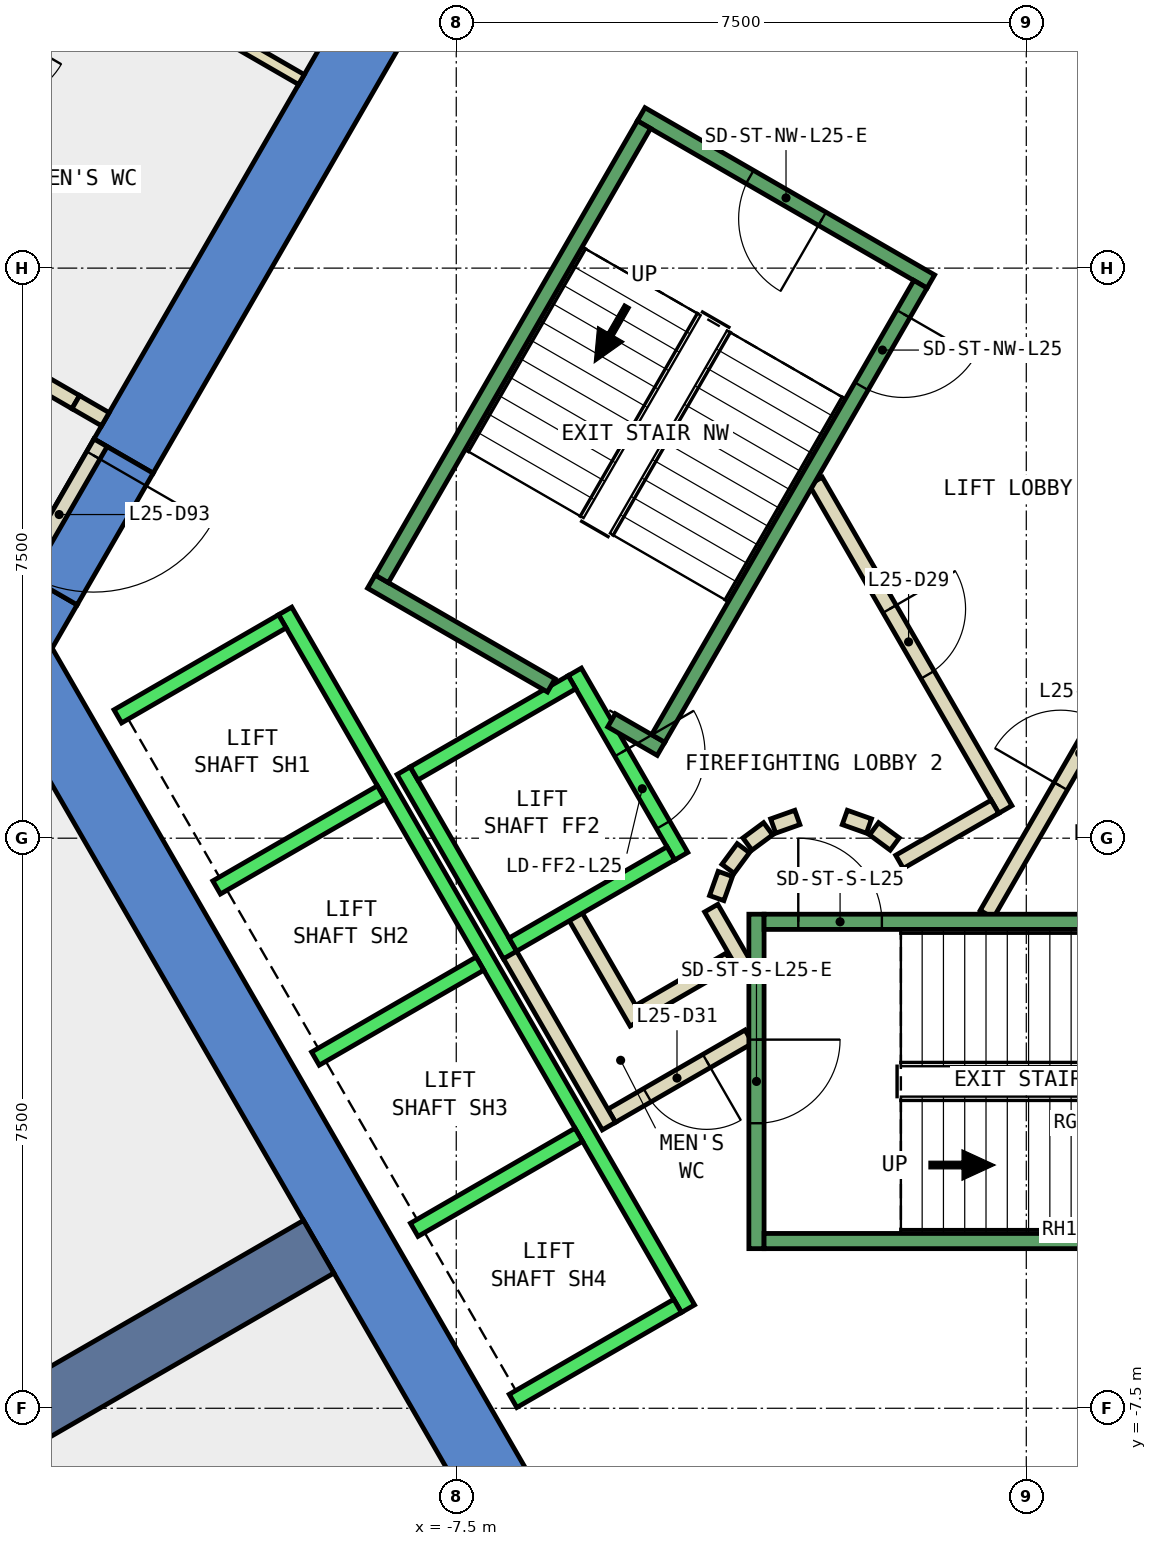
"""IFC4 building model, lengths in metres.
Left out: names, types, materials, properties, quantities, classifications, styles, units other than length and angle.
Written with IfcOpenShell. Run it as: python <this file> out.ifc"""

import sys

from ifc_helpers import new_model, si_unit, direction, frame, frame_2d, origin, place, context, subcontext, project, spatial, polyline, rectangle, outline, extrude, element, fill, save


model = new_model("IFC4")
c1 = context("Model", 3, precision=1e-05, world=origin(), true_north=direction((0.0, 1.0)))
c2 = subcontext(c1, "Body", "Model", "MODEL_VIEW")
j1 = project(units=[si_unit("LENGTHUNIT", "METRE"), si_unit("PLANEANGLEUNIT", "RADIAN")], contexts=[c1])
p1 = place(None, origin())
s1 = spatial("IfcSite", under=j1, at=p1, CompositionType="ELEMENT")
p2 = place(p1, origin())
s2 = spatial("IfcBuilding", under=s1, at=p2, CompositionType="ELEMENT")
p3 = place(p2, frame((0.0, 0.0, 116.0)))
s3 = spatial("IfcBuildingStorey", under=s2, at=p3, CompositionType="ELEMENT", Elevation=116.0)
p4 = place(p3, frame((0.0, 0.0, -0.4)))
e1 = element("IfcWall", 1, at=p4, inside=s3, PredefinedType="SHEAR", context=c2, shape_type="SweptSolid", body=[
    extrude(outline(polyline([(-12.267, 5.252), (-11.488, 4.802), (-6.409, 13.6), (-6.928, 14.5), (-12.267, 5.252)])), origin(), (0.0, 0.0, 1.0), 4.2),
])
p5 = place(p3, frame((0.0, 0.0, -0.4)))
e2 = element("IfcWall", 2, at=p5, inside=s3, PredefinedType="SHEAR", context=c2, shape_type="SweptSolid", body=[
    extrude(outline(polyline([(-12.488, 3.07), (-13.267, 3.52), (-13.856, 2.5), (-12.817, 2.5), (-12.488, 3.07)])), origin(), (0.0, 0.0, 1.0), 4.2),
])
p6 = place(p3, frame((0.0, 0.0, 3.6)))
e3 = element("IfcWall", 3, at=p6, inside=s3, PredefinedType="SHEAR", context=c2, shape_type="SweptSolid", body=[
    extrude(outline(polyline([(-13.267, 3.52), (-12.488, 3.07), (-11.488, 4.802), (-12.267, 5.252), (-13.267, 3.52)])), origin(), (0.0, 0.0, 1.0), 0.2),
])
p7 = place(p3, frame((0.0, 0.0, -0.4)))
e4 = element("IfcWall", 4, at=p7, inside=s3, PredefinedType="SHEAR", context=c2, shape_type="SweptSolid", body=[
    extrude(outline(polyline([(-13.856, 2.5), (-6.928, -9.5), (-6.409, -8.6), (-12.817, 2.5), (-13.856, 2.5)])), origin(), (0.0, 0.0, 1.0), 4.2),
])
p8 = place(p3, frame((-9.31, -5.375, -0.4), z_axis=(0.0, 0.0, 1.0), x_axis=(-0.866017533419, -0.500013631625, 0.0)))
e5 = element("IfcWall", 5, at=p8, inside=s3, PredefinedType="SHEAR", context=c2, shape_type="SweptSolid", body=[
    extrude(rectangle(XDim=9.0, YDim=0.8, at=frame_2d((4.5, 0.0))), origin(), (0.0, 0.0, 1.0), 4.2),
])
p9 = place(p3, frame((-12.815, 11.96, 0.0), z_axis=(0.0, 0.0, 1.0), x_axis=(-0.5048198861, -0.863224699946, 0.0)))
e6 = element("IfcWall", 6, at=p9, inside=s3, PredefinedType="PARTITIONING", context=c2, shape_type="SweptSolid", body=[
    extrude(rectangle(XDim=3.95, YDim=0.2, at=frame_2d((1.975, 0.0))), origin(), (0.0, 0.0, 1.0), 3.8),
])
p10 = place(p9, frame((1.475, 0.0, 0.0)))
e7 = element("IfcOpeningElement", 7, at=p10, cuts=e6, PredefinedType="OPENING", context=c2, shape_type="SweptSolid", body=[
    extrude(rectangle(XDim=1.0, YDim=2.1, at=frame_2d((0.5, 1.05))), frame((0.0, 0.11, 0.0), z_axis=(0.0, -1.0, 0.0), x_axis=(1.0, 0.0, 0.0)), (0.0, 0.0, 1.0), 0.22),
])
p11 = place(p3, frame((-15.532, 7.484, 0.0), z_axis=(0.0, 0.0, 1.0), x_axis=(0.866045954906, -0.499964402723, 0.0)))
e8 = element("IfcWall", 8, at=p11, inside=s3, PredefinedType="PARTITIONING", context=c2, shape_type="SweptSolid", body=[
    extrude(rectangle(XDim=3.494, YDim=0.2, at=frame_2d((1.747, 0.0))), origin(), (0.0, 0.0, 1.0), 3.8),
])
p12 = place(p3, frame((-3.9, -1.599, 0.0), z_axis=(0.0, 0.0, 1.0), x_axis=(-0.865969445389, -0.500096910261, 0.0)))
e9 = element("IfcWall", 9, at=p12, inside=s3, PredefinedType="PARTITIONING", context=c2, shape_type="SweptSolid", body=[
    extrude(rectangle(XDim=1.373, YDim=0.2, at=frame_2d((0.687, 0.0))), origin(), (0.0, 0.0, 1.0), 3.8),
])
p13 = place(p3, frame((-5.126, -2.422, 0.0), z_axis=(0.0, 0.0, 1.0), x_axis=(-0.500062241894, 0.865989465428, 0.0)))
e10 = element("IfcWall", 10, at=p13, inside=s3, PredefinedType="PARTITIONING", context=c2, shape_type="SweptSolid", body=[
    extrude(rectangle(XDim=1.7, YDim=0.2, at=frame_2d((0.85, 0.0))), origin(), (0.0, 0.0, 1.0), 3.8),
])
p14 = place(p3, frame((-3.65, -2.61, 0.0), z_axis=(0.0, 0.0, 1.0), x_axis=(-0.866072462134, -0.499918483688, 0.0)))
e11 = element("IfcWall", 11, at=p14, inside=s3, PredefinedType="PARTITIONING", context=c2, shape_type="SweptSolid", body=[
    extrude(rectangle(XDim=2.084, YDim=0.2, at=frame_2d((1.042, 0.0))), origin(), (0.0, 0.0, 1.0), 3.8),
])
p15 = place(p14, frame((0.642, 0.0, 0.0)))
e12 = element("IfcOpeningElement", 12, at=p15, cuts=e11, PredefinedType="OPENING", context=c2, shape_type="SweptSolid", body=[
    extrude(rectangle(XDim=0.9, YDim=2.1, at=frame_2d((0.45, 1.05))), frame((0.0, 0.11, 0.0), z_axis=(0.0, -1.0, 0.0), x_axis=(1.0, 0.0, 0.0)), (0.0, 0.0, 1.0), 0.22),
])
p16 = place(p3, frame((-5.492, -3.788, 0.0), z_axis=(0.0, 0.0, 1.0), x_axis=(-0.500008949224, 0.866020236886, 0.0)))
e13 = element("IfcWall", 13, at=p16, inside=s3, PredefinedType="PARTITIONING", context=c2, shape_type="SweptSolid", body=[
    extrude(rectangle(XDim=2.68, YDim=0.2, at=frame_2d((1.34, 0.0))), origin(), (0.0, 0.0, 1.0), 3.8),
])
p17 = place(p3, frame((-4.145, -0.92, 0.0), z_axis=(0.0, 0.0, 1.0), x_axis=(0.499743786207, -0.866173278362, 0.0)))
e14 = element("IfcWall", 14, at=p17, inside=s3, PredefinedType="PARTITIONING", context=c2, shape_type="SweptSolid", body=[
    extrude(rectangle(XDim=0.991, YDim=0.2, at=frame_2d((0.495, 0.0))), origin(), (0.0, 0.0, 1.0), 3.8),
])
p18 = place(p3, frame((-9.537, 9.981, 0.0), z_axis=(0.0, 0.0, 1.0), x_axis=(-0.866068787954, 0.499924848885, 0.0)))
e15 = element("IfcWall", 15, at=p18, inside=s3, PredefinedType="PARTITIONING", context=c2, shape_type="SweptSolid", body=[
    extrude(rectangle(XDim=3.829, YDim=0.15, at=frame_2d((1.914, 0.0))), origin(), (0.0, 0.0, 1.0), 3.8),
])
p19 = place(p3, frame((-0.52, -1.0, 0.0), z_axis=(0.0, 0.0, 1.0), x_axis=(0.50011622646, 0.865958290007, 0.0)))
e16 = element("IfcWall", 16, at=p19, inside=s3, PredefinedType="PARTITIONING", context=c2, shape_type="SweptSolid", body=[
    extrude(rectangle(XDim=4.991, YDim=0.2, at=frame_2d((2.496, 0.0))), origin(), (0.0, 0.0, 1.0), 3.8),
])
p20 = place(p19, frame((1.945, 0.0, 0.0)))
e17 = element("IfcOpeningElement", 17, at=p20, cuts=e16, PredefinedType="OPENING", context=c2, shape_type="SweptSolid", body=[
    extrude(rectangle(XDim=1.0, YDim=2.1, at=frame_2d((0.5, 1.05))), frame((0.0, 0.11, 0.0), z_axis=(0.0, -1.0, 0.0), x_axis=(1.0, 0.0, 0.0)), (0.0, 0.0, 1.0), 0.22),
])
p21 = place(p3, frame((-2.771, 4.7, 0.0), z_axis=(0.0, 0.0, 1.0), x_axis=(0.499969479948, -0.866043023828, 0.0)))
e18 = element("IfcWall", 18, at=p21, inside=s3, PredefinedType="PARTITIONING", context=c2, shape_type="SweptSolid", body=[
    extrude(rectangle(XDim=4.99, YDim=0.2, at=frame_2d((2.495, 0.0))), origin(), (0.0, 0.0, 1.0), 3.8),
])
p22 = place(p21, frame((1.945, 0.0, 0.0)))
e19 = element("IfcOpeningElement", 19, at=p22, cuts=e18, PredefinedType="OPENING", context=c2, shape_type="SweptSolid", body=[
    extrude(rectangle(XDim=1.0, YDim=2.1, at=frame_2d((0.5, 1.05))), frame((0.0, 0.11, 0.0), z_axis=(0.0, -1.0, 0.0), x_axis=(1.0, 0.0, 0.0)), (0.0, 0.0, 1.0), 0.22),
])
p23 = place(p3, frame((-0.412, 0.414, 0.0), z_axis=(0.0, 0.0, 1.0), x_axis=(-0.866017369001, -0.500013916395, 0.0)))
e20 = element("IfcWall", 20, at=p23, inside=s3, PredefinedType="PARTITIONING", context=c2, shape_type="SweptSolid", body=[
    extrude(rectangle(XDim=1.45, YDim=0.2, at=frame_2d((0.725, 0.0))), origin(), (0.0, 0.0, 1.0), 3.8),
])
p24 = place(p3, frame((-1.731, -0.077, 0.0), z_axis=(0.0, 0.0, 1.0), x_axis=(-0.804311165252, 0.594208338422, 0.0)))
e21 = element("IfcWall", 21, at=p24, inside=s3, PredefinedType="PARTITIONING", context=c2, shape_type="SweptSolid", body=[
    extrude(rectangle(XDim=0.338, YDim=0.2, at=frame_2d((0.169, 0.0))), origin(), (0.0, 0.0, 1.0), 3.8),
])
p25 = place(p3, frame((-2.07, 0.16, 0.0), z_axis=(0.0, 0.0, 1.0), x_axis=(-0.942199461132, 0.335052496547, 0.0)))
e22 = element("IfcWall", 22, at=p25, inside=s3, PredefinedType="PARTITIONING", context=c2, shape_type="SweptSolid", body=[
    extrude(rectangle(XDim=0.337, YDim=0.2, at=frame_2d((0.169, 0.0))), origin(), (0.0, 0.0, 1.0), 3.8),
])
p26 = place(p3, frame((-3.012, 0.273, 0.0), z_axis=(0.0, 0.0, 1.0), x_axis=(-0.942280615813, -0.334824194261, 0.0)))
e23 = element("IfcWall", 23, at=p26, inside=s3, PredefinedType="PARTITIONING", context=c2, shape_type="SweptSolid", body=[
    extrude(rectangle(XDim=0.338, YDim=0.2, at=frame_2d((0.169, 0.0))), origin(), (0.0, 0.0, 1.0), 3.8),
])
p27 = place(p3, frame((-3.397, 0.124, 0.0), z_axis=(0.0, 0.0, 1.0), x_axis=(-0.804311165252, -0.594208338422, 0.0)))
e24 = element("IfcWall", 24, at=p27, inside=s3, PredefinedType="PARTITIONING", context=c2, shape_type="SweptSolid", body=[
    extrude(rectangle(XDim=0.338, YDim=0.2, at=frame_2d((0.169, 0.0))), origin(), (0.0, 0.0, 1.0), 3.8),
])
p28 = place(p3, frame((-3.723, -0.131, 0.0), z_axis=(0.0, 0.0, 1.0), x_axis=(-0.594675113454, -0.803966112121, 0.0)))
e25 = element("IfcWall", 25, at=p28, inside=s3, PredefinedType="PARTITIONING", context=c2, shape_type="SweptSolid", body=[
    extrude(rectangle(XDim=0.338, YDim=0.2, at=frame_2d((0.169, 0.0))), origin(), (0.0, 0.0, 1.0), 3.8),
])
p29 = place(p3, frame((-3.96, -0.47, 0.0), z_axis=(0.0, 0.0, 1.0), x_axis=(-0.334824194261, -0.942280615813, 0.0)))
e26 = element("IfcWall", 26, at=p29, inside=s3, PredefinedType="PARTITIONING", context=c2, shape_type="SweptSolid", body=[
    extrude(rectangle(XDim=0.338, YDim=0.2, at=frame_2d((0.169, 0.0))), origin(), (0.0, 0.0, 1.0), 3.8),
])
p30 = place(p3, frame((-12.18, 5.202, 0.0), z_axis=(0.0, 0.0, 1.0), x_axis=(-0.50002537861, -0.866010750942, 0.0)))
e27 = element("IfcWall", 27, at=p30, inside=s3, PredefinedType="PARTITIONING", context=c2, shape_type="SweptSolid", body=[
    extrude(rectangle(XDim=2.0, YDim=0.2, at=frame_2d((1.0, 0.0))), origin(), (0.0, 0.0, 1.0), 2.4),
])
p31 = place(p30, frame((0.19, 0.0, 0.0)))
e28 = element("IfcOpeningElement", 28, at=p31, cuts=e27, PredefinedType="OPENING", context=c2, shape_type="SweptSolid", body=[
    extrude(rectangle(XDim=1.8, YDim=2.1, at=frame_2d((0.9, 1.05))), frame((0.0, 0.11, 0.0), z_axis=(0.0, -1.0, 0.0), x_axis=(1.0, 0.0, 0.0)), (0.0, 0.0, 1.0), 0.22),
])
p32 = place(p3, frame((-12.506, 5.737, 0.0), z_axis=(0.0, 0.0, 1.0), x_axis=(0.865624510465, -0.500693725627, 0.0)))
e29 = element("IfcWall", 29, at=p32, inside=s3, PredefinedType="PARTITIONING", context=c2, shape_type="SweptSolid", body=[
    extrude(rectangle(XDim=0.449, YDim=0.2, at=frame_2d((0.225, 0.0))), origin(), (0.0, 0.0, 1.0), 2.4),
])
p33 = place(p3, frame((-5.94, 2.188, 0.0), z_axis=(0.0, 0.0, 1.0), x_axis=(0.49994636267, -0.866056369097, 0.0)))
e30 = element("IfcWall", 30, at=p33, inside=s3, PredefinedType="STANDARD", context=c2, shape_type="SweptSolid", body=[
    extrude(rectangle(XDim=2.8, YDim=0.2, at=frame_2d((1.4, 0.0))), origin(), (0.0, 0.0, 1.0), 3.8),
])
p34 = place(p33, frame((1.225, 0.0, 0.0)))
e31 = element("IfcOpeningElement", 31, at=p34, cuts=e30, PredefinedType="OPENING", context=c2, shape_type="SweptSolid", body=[
    extrude(rectangle(XDim=1.1, YDim=2.1, at=frame_2d((0.55, 1.05))), frame((0.0, 0.11, 0.0), z_axis=(0.0, -1.0, 0.0), x_axis=(1.0, 0.0, 0.0)), (0.0, 0.0, 1.0), 0.22),
])
p35 = place(p3, frame((-8.192, 0.888, 0.0), z_axis=(0.0, 0.0, 1.0), x_axis=(0.49994636267, -0.866056369097, 0.0)))
e32 = element("IfcWall", 32, at=p35, inside=s3, PredefinedType="STANDARD", context=c2, shape_type="SweptSolid", body=[
    extrude(rectangle(XDim=2.8, YDim=0.2, at=frame_2d((1.4, 0.0))), origin(), (0.0, 0.0, 1.0), 3.8),
])
for number, where, z_axis, x_axis in (
    (33, (-5.977, 2.052, 0.0), (0.0, 0.0, 1.0), (-0.866, -0.5, 0.0)),
    (34, (-4.677, -0.2, 0.0), (0.0, 0.0, 1.0), (-0.866, -0.5, 0.0)),
):
    element("IfcWall", number, at=place(p3, frame(where, z_axis=z_axis, x_axis=x_axis)), inside=s3, PredefinedType="STANDARD", context=c2, shape_type="SweptSolid", body=[
        extrude(rectangle(XDim=2.399, YDim=0.2, at=frame_2d((1.2, 0.0))), origin(), (0.0, 0.0, 1.0), 3.8),
    ])
p36 = place(p3, frame((-9.751, 2.99, 0.0), z_axis=(0.0, 0.0, 1.0), x_axis=(0.50000090737, -0.866024879913, 0.0)))
e35 = element("IfcWall", 35, at=p36, inside=s3, PredefinedType="STANDARD", context=c2, shape_type="SweptSolid", body=[
    extrude(rectangle(XDim=10.6, YDim=0.2, at=frame_2d((5.3, 0.0))), origin(), (0.0, 0.0, 1.0), 3.8),
])
p37 = place(p3, frame((-9.788, 2.853, 0.0), z_axis=(0.0, 0.0, 1.0), x_axis=(-0.865998541277, -0.500046524342, 0.0)))
e36 = element("IfcWall", 36, at=p37, inside=s3, PredefinedType="STANDARD", context=c2, shape_type="SweptSolid", body=[
    extrude(rectangle(XDim=2.5, YDim=0.2, at=frame_2d((1.25, 0.0))), origin(), (0.0, 0.0, 1.0), 3.8),
])
for number, where, z_axis, x_axis in (
    (37, (-8.488, 0.602, 0.0), (0.0, 0.0, 1.0), (-0.866, -0.5, 0.0)),
    (38, (-7.188, -1.65, 0.0), (0.0, 0.0, 1.0), (-0.866, -0.5, 0.0)),
    (39, (-5.888, -3.902, 0.0), (0.0, 0.0, 1.0), (-0.866, -0.5, 0.0)),
    (40, (-4.588, -6.153, 0.0), (0.0, 0.0, 1.0), (-0.866, -0.5, 0.0)),
):
    element("IfcWall", number, at=place(p3, frame(where, z_axis=z_axis, x_axis=x_axis)), inside=s3, PredefinedType="STANDARD", context=c2, shape_type="SweptSolid", body=[
        extrude(rectangle(XDim=2.5, YDim=0.2, at=frame_2d((1.25, 0.0))), origin(), (0.0, 0.0, 1.0), 3.8),
    ])
p38 = place(p3, frame((-3.55, -1.0, 0.0), z_axis=(0.0, 0.0, 1.0), x_axis=(0.0, -1.0, 0.0)))
e41 = element("IfcWall", 41, at=p38, inside=s3, PredefinedType="STANDARD", context=c2, shape_type="SweptSolid", body=[
    extrude(rectangle(XDim=4.4, YDim=0.2, at=frame_2d((2.2, 0.0))), origin(), (0.0, 0.0, 1.0), 3.8),
])
p39 = place(p38, frame((1.65, 0.0, 0.0)))
e42 = element("IfcOpeningElement", 42, at=p39, cuts=e41, PredefinedType="OPENING", context=c2, shape_type="SweptSolid", body=[
    extrude(rectangle(XDim=1.1, YDim=2.2, at=frame_2d((0.55, 1.1))), frame((0.0, 0.11, 0.0), z_axis=(0.0, -1.0, 0.0), x_axis=(1.0, 0.0, 0.0)), (0.0, 0.0, 1.0), 0.22),
])
p40 = place(p3, frame((-3.45, -1.1, 0.0), z_axis=(0.0, 0.0, 1.0), x_axis=(1.0, 0.0, 0.0)))
e43 = element("IfcWall", 43, at=p40, inside=s3, PredefinedType="STANDARD", context=c2, shape_type="SweptSolid", body=[
    extrude(rectangle(XDim=6.9, YDim=0.2, at=frame_2d((3.45, 0.0))), origin(), (0.0, 0.0, 1.0), 3.8),
])
p41 = place(p40, frame((0.45, 0.0, 0.0)))
e44 = element("IfcOpeningElement", 44, at=p41, cuts=e43, PredefinedType="OPENING", context=c2, shape_type="SweptSolid", body=[
    extrude(rectangle(XDim=1.1, YDim=2.2, at=frame_2d((0.55, 1.1))), frame((0.0, 0.11, 0.0), z_axis=(0.0, -1.0, 0.0), x_axis=(1.0, 0.0, 0.0)), (0.0, 0.0, 1.0), 0.22),
])
p42 = place(p3, frame((-3.45, -5.3, 0.0), z_axis=(0.0, 0.0, 1.0), x_axis=(1.0, 0.0, 0.0)))
e45 = element("IfcWall", 45, at=p42, inside=s3, PredefinedType="STANDARD", context=c2, shape_type="SweptSolid", body=[
    extrude(rectangle(XDim=6.9, YDim=0.2, at=frame_2d((3.45, 0.0))), origin(), (0.0, 0.0, 1.0), 3.8),
])
p43 = place(p3, frame((-1.256, 7.324, 0.0), z_axis=(0.0, 0.0, 1.0), x_axis=(-0.866046073146, 0.499964197906, 0.0)))
e46 = element("IfcWall", 46, at=p43, inside=s3, PredefinedType="STANDARD", context=c2, shape_type="SweptSolid", body=[
    extrude(rectangle(XDim=4.4, YDim=0.2, at=frame_2d((2.2, 0.0))), origin(), (0.0, 0.0, 1.0), 3.8),
])
p44 = place(p43, frame((1.65, 0.0, 0.0)))
e47 = element("IfcOpeningElement", 47, at=p44, cuts=e46, PredefinedType="OPENING", context=c2, shape_type="SweptSolid", body=[
    extrude(rectangle(XDim=1.1, YDim=2.2, at=frame_2d((0.55, 1.1))), frame((0.0, 0.11, 0.0), z_axis=(0.0, -1.0, 0.0), x_axis=(1.0, 0.0, 0.0)), (0.0, 0.0, 1.0), 0.22),
])
p45 = place(p3, frame((-6.25, 2.01, 0.0), z_axis=(0.0, 0.0, 1.0), x_axis=(-0.86611865017, 0.499838457731, 0.0)))
e48 = element("IfcWall", 48, at=p45, inside=s3, PredefinedType="STANDARD", context=c2, shape_type="SweptSolid", body=[
    extrude(rectangle(XDim=2.733, YDim=0.2, at=frame_2d((1.366, 0.0))), origin(), (0.0, 0.0, 1.0), 3.8),
])
p46 = place(p3, frame((-4.806, 1.176, 0.0), z_axis=(0.0, 0.0, 1.0), x_axis=(-0.866558586415, 0.499075361355, 0.0)))
e49 = element("IfcWall", 49, at=p46, inside=s3, PredefinedType="STANDARD", context=c2, shape_type="SweptSolid", body=[
    extrude(rectangle(XDim=0.751, YDim=0.2, at=frame_2d((0.376, 0.0))), origin(), (0.0, 0.0, 1.0), 3.8),
])
p47 = place(p3, frame((-1.393, 7.288, 0.0), z_axis=(0.0, 0.0, 1.0), x_axis=(-0.499963383562, -0.866046543262, 0.0)))
e50 = element("IfcWall", 50, at=p47, inside=s3, PredefinedType="STANDARD", context=c2, shape_type="SweptSolid", body=[
    extrude(rectangle(XDim=6.9, YDim=0.2, at=frame_2d((3.45, 0.0))), origin(), (0.0, 0.0, 1.0), 3.8),
])
p48 = place(p47, frame((0.45, 0.0, 0.0)))
e51 = element("IfcOpeningElement", 51, at=p48, cuts=e50, PredefinedType="OPENING", context=c2, shape_type="SweptSolid", body=[
    extrude(rectangle(XDim=1.1, YDim=2.2, at=frame_2d((0.55, 1.1))), frame((0.0, 0.11, 0.0), z_axis=(0.0, -1.0, 0.0), x_axis=(1.0, 0.0, 0.0)), (0.0, 0.0, 1.0), 0.22),
])
p49 = place(p3, frame((-5.03, 9.388, 0.0), z_axis=(0.0, 0.0, 1.0), x_axis=(-0.499978703459, -0.866037698999, 0.0)))
e52 = element("IfcWall", 52, at=p49, inside=s3, PredefinedType="STANDARD", context=c2, shape_type="SweptSolid", body=[
    extrude(rectangle(XDim=6.9, YDim=0.2, at=frame_2d((3.45, 0.0))), origin(), (0.0, 0.0, 1.0), 3.8),
])
p50 = place(p20, origin())
e53 = element("IfcDoor", 53, at=p50, inside=s3, OperationType="SINGLE_SWING_LEFT", PredefinedType="DOOR", context=c2, shape_type="SweptSolid", body=[
    extrude(rectangle(XDim=1.0, YDim=2.1, at=frame_2d((0.5, 1.05))), frame((0.0, 0.025, 0.0), z_axis=(0.0, -1.0, 0.0), x_axis=(1.0, 0.0, 0.0)), (0.0, 0.0, 1.0), 0.05),
])
fill(e17, e53)
p51 = place(p22, origin())
e54 = element("IfcDoor", 54, at=p51, inside=s3, OperationType="SINGLE_SWING_RIGHT", PredefinedType="DOOR", context=c2, shape_type="SweptSolid", body=[
    extrude(rectangle(XDim=1.0, YDim=2.1, at=frame_2d((0.5, 1.05))), frame((0.0, 0.025, 0.0), z_axis=(0.0, -1.0, 0.0), x_axis=(1.0, 0.0, 0.0)), (0.0, 0.0, 1.0), 0.05),
])
fill(e19, e54)
p52 = place(p15, origin())
e55 = element("IfcDoor", 55, at=p52, inside=s3, OperationType="SINGLE_SWING_LEFT", PredefinedType="DOOR", context=c2, shape_type="SweptSolid", body=[
    extrude(rectangle(XDim=0.9, YDim=2.1, at=frame_2d((0.45, 1.05))), frame((0.0, 0.025, 0.0), z_axis=(0.0, -1.0, 0.0), x_axis=(1.0, 0.0, 0.0)), (0.0, 0.0, 1.0), 0.05),
])
fill(e12, e55)
p53 = place(p31, origin())
e56 = element("IfcDoor", 56, at=p53, inside=s3, OperationType="DOUBLE_DOOR_SINGLE_SWING", PredefinedType="DOOR", context=c2, shape_type="SweptSolid", body=[
    extrude(rectangle(XDim=1.8, YDim=2.1, at=frame_2d((0.9, 1.05))), frame((0.0, 0.025, 0.0), z_axis=(0.0, -1.0, 0.0), x_axis=(1.0, 0.0, 0.0)), (0.0, 0.0, 1.0), 0.05),
])
fill(e28, e56)
p54 = place(p34, origin())
e57 = element("IfcDoor", 57, at=p54, inside=s3, OperationType="SLIDING_TO_LEFT", PredefinedType="DOOR", context=c2, shape_type="SweptSolid", body=[
    extrude(rectangle(XDim=1.1, YDim=2.1, at=frame_2d((0.55, 1.05))), frame((0.0, 0.025, 0.0), z_axis=(0.0, -1.0, 0.0), x_axis=(1.0, 0.0, 0.0)), (0.0, 0.0, 1.0), 0.05),
])
fill(e31, e57)
p55 = place(p41, origin())
e58 = element("IfcDoor", 58, at=p55, inside=s3, OperationType="SINGLE_SWING_LEFT", PredefinedType="DOOR", context=c2, shape_type="SweptSolid", body=[
    extrude(rectangle(XDim=1.1, YDim=2.2, at=frame_2d((0.55, 1.1))), frame((0.0, 0.025, 0.0), z_axis=(0.0, -1.0, 0.0), x_axis=(1.0, 0.0, 0.0)), (0.0, 0.0, 1.0), 0.05),
])
fill(e44, e58)
p56 = place(p39, origin())
e59 = element("IfcDoor", 59, at=p56, inside=s3, OperationType="SINGLE_SWING_LEFT", PredefinedType="DOOR", context=c2, shape_type="SweptSolid", body=[
    extrude(rectangle(XDim=1.1, YDim=2.2, at=frame_2d((0.55, 1.1))), frame((0.0, 0.025, 0.0), z_axis=(0.0, -1.0, 0.0), x_axis=(1.0, 0.0, 0.0)), (0.0, 0.0, 1.0), 0.05),
])
fill(e42, e59)
p57 = place(p48, origin())
e60 = element("IfcDoor", 60, at=p57, inside=s3, OperationType="SINGLE_SWING_LEFT", PredefinedType="DOOR", context=c2, shape_type="SweptSolid", body=[
    extrude(rectangle(XDim=1.1, YDim=2.2, at=frame_2d((0.55, 1.1))), frame((0.0, 0.025, 0.0), z_axis=(0.0, -1.0, 0.0), x_axis=(1.0, 0.0, 0.0)), (0.0, 0.0, 1.0), 0.05),
])
fill(e51, e60)
p58 = place(p44, origin())
e61 = element("IfcDoor", 61, at=p58, inside=s3, OperationType="SINGLE_SWING_LEFT", PredefinedType="DOOR", context=c2, shape_type="SweptSolid", body=[
    extrude(rectangle(XDim=1.1, YDim=2.2, at=frame_2d((0.55, 1.1))), frame((0.0, 0.025, 0.0), z_axis=(0.0, -1.0, 0.0), x_axis=(1.0, 0.0, 0.0)), (0.0, 0.0, 1.0), 0.05),
])
fill(e47, e61)
save(model, sys.argv[1])
